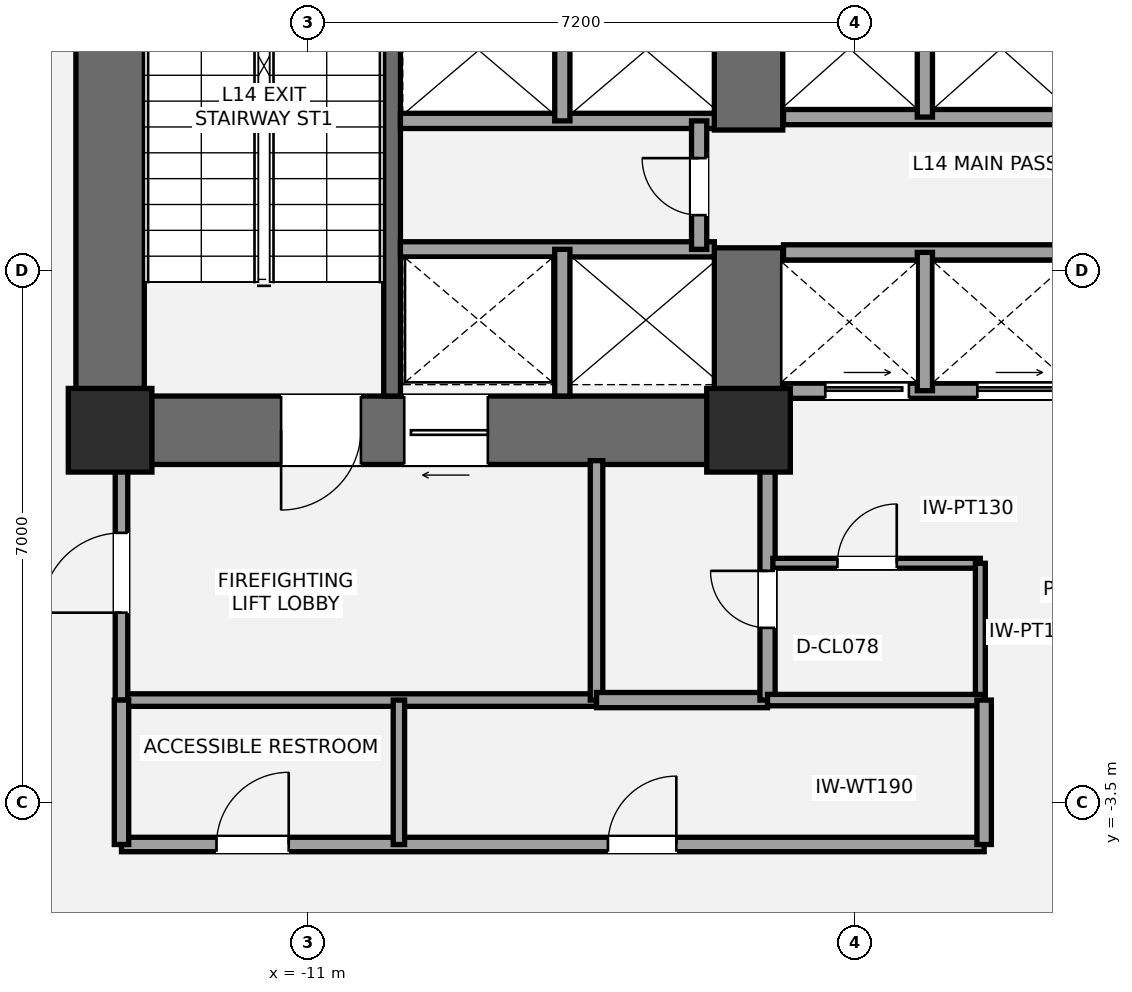
"""IFC4 building model, lengths in metres.
Left out: names, types, materials, properties, quantities, classifications, styles, units other than length and angle.
Written with IfcOpenShell. Run it as: python <this file> out.ifc"""

import sys

from ifc_helpers import new_model, si_unit, direction, frame, frame_2d, origin, origin_2d, place, context, subcontext, project, spatial, rectangle, extrude, element, fill, save


model = new_model("IFC4")
c1 = context("Model", 3, precision=1e-05, world=origin(), true_north=direction((0.0, 1.0)))
c2 = subcontext(c1, "Body", "Model", "MODEL_VIEW")
j1 = project(units=[si_unit("LENGTHUNIT", "METRE"), si_unit("PLANEANGLEUNIT", "RADIAN")], contexts=[c1])
p1 = place(None, origin())
s1 = spatial("IfcSite", under=j1, at=p1, CompositionType="ELEMENT")
p2 = place(p1, origin())
s2 = spatial("IfcBuilding", under=s1, at=p2, CompositionType="ELEMENT")
p3 = place(p2, frame((0.0, 0.0, 55.8)))
s3 = spatial("IfcBuildingStorey", under=s2, at=p3, CompositionType="ELEMENT", Elevation=55.8)
p4 = place(p3, frame((-13.6, 0.95, 0.0), z_axis=(0.0, 0.0, 1.0), x_axis=(0.0, 1.0, 0.0)))
e1 = element("IfcWall", 1, at=p4, inside=s3, PredefinedType="SHEAR", context=c2, shape_type="SweptSolid", body=[
    extrude(rectangle(XDim=8.95, YDim=0.9, at=frame_2d((4.475, 0.0))), origin(), (0.0, 0.0, 1.0), 3.6),
])
p5 = place(p3, frame((-4.75, 1.4, 0.0), z_axis=(0.0, 0.0, 1.0), x_axis=(-1.0, 0.0, 0.0)))
e2 = element("IfcWall", 2, at=p5, inside=s3, PredefinedType="SHEAR", context=c2, shape_type="SweptSolid", body=[
    extrude(rectangle(XDim=9.3, YDim=0.9, at=frame_2d((4.65, 0.0))), origin(), (0.0, 0.0, 1.0), 3.6),
])
p6 = place(p5, frame((5.55, 0.0, 0.0)))
e3 = element("IfcOpeningElement", 3, at=p6, cuts=e2, PredefinedType="OPENING", context=c2, shape_type="SweptSolid", body=[
    extrude(rectangle(XDim=1.05, YDim=2.15, at=frame_2d((0.525, 1.075))), frame((0.0, 0.46, 0.0), z_axis=(0.0, -1.0, 0.0), x_axis=(1.0, 0.0, 0.0)), (0.0, 0.0, 1.0), 0.92),
])
p7 = place(p5, frame((3.88, 0.0, 0.0)))
e4 = element("IfcOpeningElement", 4, at=p7, cuts=e2, PredefinedType="OPENING", context=c2, shape_type="SweptSolid", body=[
    extrude(rectangle(XDim=1.1, YDim=2.2, at=frame_2d((0.55, 1.1))), frame((0.0, 0.46, 0.0), z_axis=(0.0, -1.0, 0.0), x_axis=(1.0, 0.0, 0.0)), (0.0, 0.0, 1.0), 0.92),
])
p8 = place(p3, frame((-5.2, 0.95, 0.0), z_axis=(0.0, 0.0, 1.0), x_axis=(0.0, 1.0, 0.0)))
e5 = element("IfcWall", 5, at=p8, inside=s3, PredefinedType="SHEAR", context=c2, shape_type="SweptSolid", body=[
    extrude(rectangle(XDim=2.85, YDim=0.9, at=frame_2d((1.425, 0.0))), origin(), (0.0, 0.0, 1.0), 3.6),
])
p9 = place(p3, frame((-5.2, 5.35, 0.0), z_axis=(0.0, 0.0, 1.0), x_axis=(0.0, 1.0, 0.0)))
e6 = element("IfcWall", 6, at=p9, inside=s3, PredefinedType="SHEAR", context=c2, shape_type="SweptSolid", body=[
    extrude(rectangle(XDim=2.0, YDim=0.9, at=frame_2d((1.0, 0.0))), origin(), (0.0, 0.0, 1.0), 3.6),
])
p10 = place(p3, frame((-9.89, 1.85, 0.0), z_axis=(0.0, 0.0, 1.0), x_axis=(0.0, 1.0, 0.0)))
e7 = element("IfcWall", 7, at=p10, inside=s3, PredefinedType="SHEAR", context=c2, shape_type="SweptSolid", body=[
    extrude(rectangle(XDim=7.15, YDim=0.22, at=frame_2d((3.575, 0.0))), origin(), (0.0, 0.0, 1.0), 3.6),
])
for number, where, z_axis, x_axis in (
    (8, (-13.6, 1.4, 0.0), (0.0, 0.0, 1.0), (1.0, 0.0, 0.0)),
    (9, (-5.2, 1.4, 0.0), (0.0, 0.0, 1.0), (1.0, 0.0, 0.0)),
):
    element("IfcColumn", number, at=place(p3, frame(where, z_axis=z_axis, x_axis=x_axis)), inside=s3, PredefinedType="COLUMN", context=c2, shape_type="SweptSolid", body=[
        extrude(rectangle(XDim=1.1, YDim=1.1, at=origin_2d()), origin(), (0.0, 0.0, 1.0), 3.6),
    ])
p11 = place(p3, frame((-13.45, -2.15, 0.0), z_axis=(0.0, 0.0, 1.0), x_axis=(1.0, 0.0, 0.0)))
e10 = element("IfcWall", 10, at=p11, inside=s3, PredefinedType="PARTITIONING", context=c2, shape_type="SweptSolid", body=[
    extrude(rectangle(XDim=6.25, YDim=0.165, at=frame_2d((3.125, 0.0))), origin(), (0.0, 0.0, 1.0), 3.4),
])
p12 = place(p3, frame((-13.45, -2.15, 0.0), z_axis=(0.0, 0.0, 1.0), x_axis=(0.0, 1.0, 0.0)))
e11 = element("IfcWall", 11, at=p12, inside=s3, PredefinedType="PARTITIONING", context=c2, shape_type="SweptSolid", body=[
    extrude(rectangle(XDim=3.15, YDim=0.165, at=frame_2d((1.575, 0.0))), origin(), (0.0, 0.0, 1.0), 2.853),
])
p13 = place(p12, frame((1.15, 0.0, 0.0)))
e12 = element("IfcOpeningElement", 12, at=p13, cuts=e11, PredefinedType="OPENING", context=c2, shape_type="SweptSolid", body=[
    extrude(rectangle(XDim=1.05, YDim=2.15, at=frame_2d((0.525, 1.075))), frame((0.0, 0.093, 0.0), z_axis=(0.0, -1.0, 0.0), x_axis=(1.0, 0.0, 0.0)), (0.0, 0.0, 1.0), 0.185),
])
p14 = place(p3, frame((-7.2, -2.15, 0.0), z_axis=(0.0, 0.0, 1.0), x_axis=(0.0, 1.0, 0.0)))
e13 = element("IfcWall", 13, at=p14, inside=s3, PredefinedType="PARTITIONING", context=c2, shape_type="SweptSolid", body=[
    extrude(rectangle(XDim=3.15, YDim=0.165, at=frame_2d((1.575, 0.0))), origin(), (0.0, 0.0, 1.0), 3.4),
])
p15 = place(p3, frame((-7.2, -2.15, 0.0), z_axis=(0.0, 0.0, 1.0), x_axis=(1.0, 0.0, 0.0)))
e14 = element("IfcWall", 14, at=p15, inside=s3, PredefinedType="SOLIDWALL", context=c2, shape_type="SweptSolid", body=[
    extrude(rectangle(XDim=2.25, YDim=0.2, at=frame_2d((1.125, 0.0))), origin(), (0.0, 0.0, 1.0), 3.4),
])
p16 = place(p3, frame((-4.95, -2.15, 0.0), z_axis=(0.0, 0.0, 1.0), x_axis=(0.0, 1.0, 0.0)))
e15 = element("IfcWall", 15, at=p16, inside=s3, PredefinedType="SOLIDWALL", context=c2, shape_type="SweptSolid", body=[
    extrude(rectangle(XDim=3.15, YDim=0.2, at=frame_2d((1.575, 0.0))), origin(), (0.0, 0.0, 1.0), 2.853),
])
p17 = place(p16, frame((0.95, 0.0, 0.0)))
e16 = element("IfcOpeningElement", 16, at=p17, cuts=e15, PredefinedType="OPENING", context=c2, shape_type="SweptSolid", body=[
    extrude(rectangle(XDim=0.75, YDim=2.1, at=frame_2d((0.375, 1.05))), frame((0.0, 0.11, 0.0), z_axis=(0.0, -1.0, 0.0), x_axis=(1.0, 0.0, 0.0)), (0.0, 0.0, 1.0), 0.22),
])
p18 = place(p3, frame((-4.88, -0.35, 0.0), z_axis=(0.0, 0.0, 1.0), x_axis=(1.0, 0.0, 0.0)))
e17 = element("IfcWall", 17, at=p18, inside=s3, PredefinedType="PARTITIONING", context=c2, shape_type="SweptSolid", body=[
    extrude(rectangle(XDim=2.73, YDim=0.13, at=frame_2d((1.365, 0.0))), origin(), (0.0, 0.0, 1.0), 3.4),
])
p19 = place(p18, frame((0.85, 0.0, 0.0)))
e18 = element("IfcOpeningElement", 18, at=p19, cuts=e17, PredefinedType="OPENING", context=c2, shape_type="SweptSolid", body=[
    extrude(rectangle(XDim=0.78, YDim=2.1, at=frame_2d((0.39, 1.05))), frame((0.0, 0.075, 0.0), z_axis=(0.0, -1.0, 0.0), x_axis=(1.0, 0.0, 0.0)), (0.0, 0.0, 1.0), 0.15),
])
p20 = place(p3, frame((-2.15, -2.15, 0.0), z_axis=(0.0, 0.0, 1.0), x_axis=(0.0, 1.0, 0.0)))
e19 = element("IfcWall", 19, at=p20, inside=s3, PredefinedType="PARTITIONING", context=c2, shape_type="SweptSolid", body=[
    extrude(rectangle(XDim=1.8, YDim=0.13, at=frame_2d((0.9, 0.0))), origin(), (0.0, 0.0, 1.0), 3.4),
])
p21 = place(p3, frame((-9.78, 3.78, 0.0), z_axis=(0.0, 0.0, 1.0), x_axis=(1.0, 0.0, 0.0)))
e20 = element("IfcWall", 20, at=p21, inside=s3, PredefinedType="SOLIDWALL", context=c2, shape_type="SweptSolid", body=[
    extrude(rectangle(XDim=4.13, YDim=0.2, at=frame_2d((2.065, 0.0))), origin(), (0.0, 0.0, 1.0), 3.4),
])
p22 = place(p3, frame((-7.65, 1.85, 0.0), z_axis=(0.0, 0.0, 1.0), x_axis=(0.0, 1.0, 0.0)))
e21 = element("IfcWall", 21, at=p22, inside=s3, PredefinedType="SOLIDWALL", context=c2, shape_type="SweptSolid", body=[
    extrude(rectangle(XDim=1.93, YDim=0.2, at=frame_2d((0.965, 0.0))), origin(), (0.0, 0.0, 1.0), 3.4),
])
p23 = place(p3, frame((-9.78, 5.47, 0.0), z_axis=(0.0, 0.0, 1.0), x_axis=(1.0, 0.0, 0.0)))
e22 = element("IfcWall", 22, at=p23, inside=s3, PredefinedType="SOLIDWALL", context=c2, shape_type="SweptSolid", body=[
    extrude(rectangle(XDim=4.13, YDim=0.2, at=frame_2d((2.065, 0.0))), origin(), (0.0, 0.0, 1.0), 3.4),
])
p24 = place(p3, frame((-7.65, 5.47, 0.0), z_axis=(0.0, 0.0, 1.0), x_axis=(0.0, 1.0, 0.0)))
e23 = element("IfcWall", 23, at=p24, inside=s3, PredefinedType="SOLIDWALL", context=c2, shape_type="SweptSolid", body=[
    extrude(rectangle(XDim=1.86, YDim=0.2, at=frame_2d((0.93, 0.0))), origin(), (0.0, 0.0, 1.0), 3.4),
])
p25 = place(p3, frame((-5.85, 3.78, 0.0), z_axis=(0.0, 0.0, 1.0), x_axis=(0.0, 1.0, 0.0)))
e24 = element("IfcWall", 24, at=p25, inside=s3, PredefinedType="SOLIDWALL", context=c2, shape_type="SweptSolid", body=[
    extrude(rectangle(XDim=1.69, YDim=0.2, at=frame_2d((0.845, 0.0))), origin(), (0.0, 0.0, 1.0), 3.4),
])
p26 = place(p25, frame((0.45, 0.0, 0.0)))
e25 = element("IfcOpeningElement", 25, at=p26, cuts=e24, PredefinedType="OPENING", context=c2, shape_type="SweptSolid", body=[
    extrude(rectangle(XDim=0.75, YDim=2.1, at=frame_2d((0.375, 1.05))), frame((0.0, 0.11, 0.0), z_axis=(0.0, -1.0, 0.0), x_axis=(1.0, 0.0, 0.0)), (0.0, 0.0, 1.0), 0.22),
])
p27 = place(p3, frame((-4.74, 1.92, 0.0), z_axis=(0.0, 0.0, 1.0), x_axis=(1.0, 0.0, 0.0)))
e26 = element("IfcWall", 26, at=p27, inside=s3, PredefinedType="SOLIDWALL", context=c2, shape_type="SweptSolid", body=[
    extrude(rectangle(XDim=3.86, YDim=0.2, at=frame_2d((1.93, 0.0))), origin(), (0.0, 0.0, 1.0), 2.39),
])
p28 = place(p27, frame((0.55, 0.0, 0.0)))
e27 = element("IfcOpeningElement", 27, at=p28, cuts=e26, PredefinedType="OPENING", context=c2, shape_type="SweptSolid", body=[
    extrude(rectangle(XDim=1.1, YDim=2.2, at=frame_2d((0.55, 1.1))), frame((0.0, 0.11, 0.0), z_axis=(0.0, -1.0, 0.0), x_axis=(1.0, 0.0, 0.0)), (0.0, 0.0, 1.0), 0.22),
])
p29 = place(p27, frame((2.55, 0.0, 0.0)))
e28 = element("IfcOpeningElement", 28, at=p29, cuts=e26, PredefinedType="OPENING", context=c2, shape_type="SweptSolid", body=[
    extrude(rectangle(XDim=1.1, YDim=2.2, at=frame_2d((0.55, 1.1))), frame((0.0, 0.11, 0.0), z_axis=(0.0, -1.0, 0.0), x_axis=(1.0, 0.0, 0.0)), (0.0, 0.0, 1.0), 0.22),
])
p30 = place(p3, frame((-4.74, 3.74, 0.0), z_axis=(0.0, 0.0, 1.0), x_axis=(1.0, 0.0, 0.0)))
e29 = element("IfcWall", 29, at=p30, inside=s3, PredefinedType="SOLIDWALL", context=c2, shape_type="SweptSolid", body=[
    extrude(rectangle(XDim=3.86, YDim=0.2, at=frame_2d((1.93, 0.0))), origin(), (0.0, 0.0, 1.0), 3.4),
])
p31 = place(p3, frame((-2.88, 1.92, 0.0), z_axis=(0.0, 0.0, 1.0), x_axis=(0.0, 1.0, 0.0)))
e30 = element("IfcWall", 30, at=p31, inside=s3, PredefinedType="SOLIDWALL", context=c2, shape_type="SweptSolid", body=[
    extrude(rectangle(XDim=1.82, YDim=0.2, at=frame_2d((0.91, 0.0))), origin(), (0.0, 0.0, 1.0), 3.4),
])
p32 = place(p3, frame((-4.74, 5.52, 0.0), z_axis=(0.0, 0.0, 1.0), x_axis=(1.0, 0.0, 0.0)))
e31 = element("IfcWall", 31, at=p32, inside=s3, PredefinedType="SOLIDWALL", context=c2, shape_type="SweptSolid", body=[
    extrude(rectangle(XDim=3.86, YDim=0.2, at=frame_2d((1.93, 0.0))), origin(), (0.0, 0.0, 1.0), 3.4),
])
p33 = place(p3, frame((-2.88, 5.52, 0.0), z_axis=(0.0, 0.0, 1.0), x_axis=(0.0, 1.0, 0.0)))
e32 = element("IfcWall", 32, at=p33, inside=s3, PredefinedType="SOLIDWALL", context=c2, shape_type="SweptSolid", body=[
    extrude(rectangle(XDim=1.81, YDim=0.2, at=frame_2d((0.905, 0.0))), origin(), (0.0, 0.0, 1.0), 3.4),
])
p34 = place(p3, frame((-13.45, -4.05, 0.0), z_axis=(0.0, 0.0, 1.0), x_axis=(1.0, 0.0, 0.0)))
e33 = element("IfcWall", 33, at=p34, inside=s3, PredefinedType="PLUMBINGWALL", context=c2, shape_type="SweptSolid", body=[
    extrude(rectangle(XDim=11.35, YDim=0.19, at=frame_2d((5.675, 0.0))), origin(), (0.0, 0.0, 1.0), 3.4),
])
p35 = place(p34, frame((1.25, 0.0, 0.0)))
e34 = element("IfcOpeningElement", 34, at=p35, cuts=e33, PredefinedType="OPENING", context=c2, shape_type="SweptSolid", body=[
    extrude(rectangle(XDim=0.95, YDim=2.15, at=frame_2d((0.475, 1.075))), frame((0.0, 0.105, 0.0), z_axis=(0.0, -1.0, 0.0), x_axis=(1.0, 0.0, 0.0)), (0.0, 0.0, 1.0), 0.21),
])
p36 = place(p34, frame((6.4, 0.0, 0.0)))
e35 = element("IfcOpeningElement", 35, at=p36, cuts=e33, PredefinedType="OPENING", context=c2, shape_type="SweptSolid", body=[
    extrude(rectangle(XDim=0.9, YDim=2.1, at=frame_2d((0.45, 1.05))), frame((0.0, 0.105, 0.0), z_axis=(0.0, -1.0, 0.0), x_axis=(1.0, 0.0, 0.0)), (0.0, 0.0, 1.0), 0.21),
])
p37 = place(p3, frame((-4.95, -2.15, 0.0), z_axis=(0.0, 0.0, 1.0), x_axis=(1.0, 0.0, 0.0)))
e36 = element("IfcWall", 36, at=p37, inside=s3, PredefinedType="PLUMBINGWALL", context=c2, shape_type="SweptSolid", body=[
    extrude(rectangle(XDim=2.85, YDim=0.15, at=frame_2d((1.425, 0.0))), origin(), (0.0, 0.0, 1.0), 3.4),
])
p38 = place(p3, frame((-13.45, -4.05, 0.0), z_axis=(0.0, 0.0, 1.0), x_axis=(0.0, 1.0, 0.0)))
e37 = element("IfcWall", 37, at=p38, inside=s3, PredefinedType="PLUMBINGWALL", context=c2, shape_type="SweptSolid", body=[
    extrude(rectangle(XDim=1.9, YDim=0.19, at=frame_2d((0.95, 0.0))), origin(), (0.0, 0.0, 1.0), 2.853),
])
p39 = place(p3, frame((-2.1, -4.05, 0.0), z_axis=(0.0, 0.0, 1.0), x_axis=(0.0, 1.0, 0.0)))
e38 = element("IfcWall", 38, at=p39, inside=s3, PredefinedType="PLUMBINGWALL", context=c2, shape_type="SweptSolid", body=[
    extrude(rectangle(XDim=1.9, YDim=0.19, at=frame_2d((0.95, 0.0))), origin(), (0.0, 0.0, 1.0), 3.4),
])
p40 = place(p3, frame((-9.8, -4.05, 0.0), z_axis=(0.0, 0.0, 1.0), x_axis=(0.0, 1.0, 0.0)))
e39 = element("IfcWall", 39, at=p40, inside=s3, PredefinedType="PLUMBINGWALL", context=c2, shape_type="SweptSolid", body=[
    extrude(rectangle(XDim=1.9, YDim=0.15, at=frame_2d((0.95, 0.0))), origin(), (0.0, 0.0, 1.0), 3.4),
])
p41 = place(p6, origin())
e40 = element("IfcDoor", 40, at=p41, inside=s3, OperationType="SINGLE_SWING_RIGHT", PredefinedType="DOOR", context=c2, shape_type="SweptSolid", body=[
    extrude(rectangle(XDim=1.05, YDim=2.15, at=frame_2d((0.525, 1.075))), frame((0.0, 0.025, 0.0), z_axis=(0.0, -1.0, 0.0), x_axis=(1.0, 0.0, 0.0)), (0.0, 0.0, 1.0), 0.05),
])
fill(e3, e40)
p42 = place(p13, origin())
e41 = element("IfcDoor", 41, at=p42, inside=s3, OperationType="SINGLE_SWING_LEFT", PredefinedType="DOOR", context=c2, shape_type="SweptSolid", body=[
    extrude(rectangle(XDim=1.05, YDim=2.15, at=frame_2d((0.525, 1.075))), frame((0.0, 0.025, 0.0), z_axis=(0.0, -1.0, 0.0), x_axis=(1.0, 0.0, 0.0)), (0.0, 0.0, 1.0), 0.05),
])
fill(e12, e41)
p43 = place(p17, origin())
e42 = element("IfcDoor", 42, at=p43, inside=s3, OperationType="SINGLE_SWING_RIGHT", PredefinedType="DOOR", context=c2, shape_type="SweptSolid", body=[
    extrude(rectangle(XDim=0.75, YDim=2.1, at=frame_2d((0.375, 1.05))), frame((0.0, 0.025, 0.0), z_axis=(0.0, -1.0, 0.0), x_axis=(1.0, 0.0, 0.0)), (0.0, 0.0, 1.0), 0.05),
])
fill(e16, e42)
p44 = place(p19, origin())
e43 = element("IfcDoor", 43, at=p44, inside=s3, OperationType="SINGLE_SWING_RIGHT", PredefinedType="DOOR", context=c2, shape_type="SweptSolid", body=[
    extrude(rectangle(XDim=0.78, YDim=2.1, at=frame_2d((0.39, 1.05))), frame((0.0, 0.025, 0.0), z_axis=(0.0, -1.0, 0.0), x_axis=(1.0, 0.0, 0.0)), (0.0, 0.0, 1.0), 0.05),
])
fill(e18, e43)
p45 = place(p7, origin())
e44 = element("IfcDoor", 44, at=p45, inside=s3, OperationType="SLIDING_TO_LEFT", PredefinedType="DOOR", context=c2, shape_type="SweptSolid", body=[
    extrude(rectangle(XDim=1.1, YDim=2.2, at=frame_2d((0.55, 1.1))), frame((0.0, 0.025, 0.0), z_axis=(0.0, -1.0, 0.0), x_axis=(1.0, 0.0, 0.0)), (0.0, 0.0, 1.0), 0.05),
])
fill(e4, e44)
p46 = place(p26, origin())
e45 = element("IfcDoor", 45, at=p46, inside=s3, OperationType="SINGLE_SWING_RIGHT", PredefinedType="DOOR", context=c2, shape_type="SweptSolid", body=[
    extrude(rectangle(XDim=0.75, YDim=2.1, at=frame_2d((0.375, 1.05))), frame((0.0, 0.025, 0.0), z_axis=(0.0, -1.0, 0.0), x_axis=(1.0, 0.0, 0.0)), (0.0, 0.0, 1.0), 0.05),
])
fill(e25, e45)
p47 = place(p28, origin())
e46 = element("IfcDoor", 46, at=p47, inside=s3, OperationType="SLIDING_TO_LEFT", PredefinedType="DOOR", context=c2, shape_type="SweptSolid", body=[
    extrude(rectangle(XDim=1.1, YDim=2.2, at=frame_2d((0.55, 1.1))), frame((0.0, 0.025, 0.0), z_axis=(0.0, -1.0, 0.0), x_axis=(1.0, 0.0, 0.0)), (0.0, 0.0, 1.0), 0.05),
])
fill(e27, e46)
p48 = place(p29, origin())
e47 = element("IfcDoor", 47, at=p48, inside=s3, OperationType="SLIDING_TO_LEFT", PredefinedType="DOOR", context=c2, shape_type="SweptSolid", body=[
    extrude(rectangle(XDim=1.1, YDim=2.2, at=frame_2d((0.55, 1.1))), frame((0.0, 0.025, 0.0), z_axis=(0.0, -1.0, 0.0), x_axis=(1.0, 0.0, 0.0)), (0.0, 0.0, 1.0), 0.05),
])
fill(e28, e47)
p49 = place(p35, origin())
e48 = element("IfcDoor", 48, at=p49, inside=s3, OperationType="SINGLE_SWING_RIGHT", PredefinedType="DOOR", context=c2, shape_type="SweptSolid", body=[
    extrude(rectangle(XDim=0.95, YDim=2.15, at=frame_2d((0.475, 1.075))), frame((0.0, 0.025, 0.0), z_axis=(0.0, -1.0, 0.0), x_axis=(1.0, 0.0, 0.0)), (0.0, 0.0, 1.0), 0.05),
])
fill(e34, e48)
p50 = place(p36, origin())
e49 = element("IfcDoor", 49, at=p50, inside=s3, OperationType="SINGLE_SWING_RIGHT", PredefinedType="DOOR", context=c2, shape_type="SweptSolid", body=[
    extrude(rectangle(XDim=0.9, YDim=2.1, at=frame_2d((0.45, 1.05))), frame((0.0, 0.025, 0.0), z_axis=(0.0, -1.0, 0.0), x_axis=(1.0, 0.0, 0.0)), (0.0, 0.0, 1.0), 0.05),
])
fill(e35, e49)
save(model, sys.argv[1])
